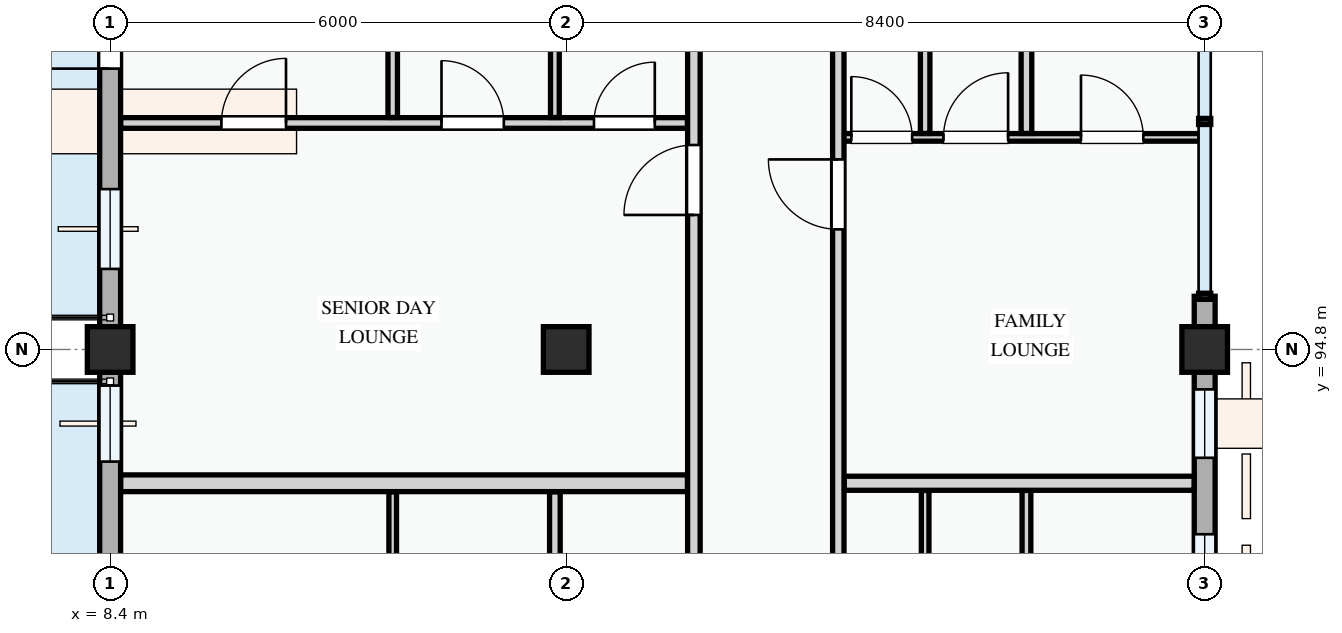
"""IFC4 building model, lengths in metres.
Left out: names, types, materials, properties, quantities, classifications, styles, units other than length and angle.
Written with IfcOpenShell. Run it as: python <this file> out.ifc"""

import sys

from ifc_helpers import new_model, si_unit, direction, frame, frame_2d, origin, origin_2d, place, context, subcontext, project, spatial, rectangle, extrude, element, fill, save


model = new_model("IFC4")
c1 = context("Model", 3, precision=1e-05, world=origin(), true_north=direction((0.0, 1.0)))
c2 = subcontext(c1, "Body", "Model", "MODEL_VIEW")
j1 = project(units=[si_unit("LENGTHUNIT", "METRE"), si_unit("PLANEANGLEUNIT", "RADIAN")], contexts=[c1])
p1 = place(None, origin())
s1 = spatial("IfcSite", under=j1, at=p1, CompositionType="ELEMENT")
p2 = place(p1, origin())
s2 = spatial("IfcBuilding", under=s1, at=p2, CompositionType="ELEMENT")
p3 = place(p2, frame((0.0, 0.0, 31.2)))
s3 = spatial("IfcBuildingStorey", under=s2, at=p3, CompositionType="ELEMENT", Elevation=31.2)
for number, where, z_axis, x_axis in (
    (1, (8.4, 94.8, 0.0), (0.0, 0.0, 1.0), (1.0, 0.0, 0.0)),
    (2, (14.4, 94.8, 0.0), (0.0, 0.0, 1.0), (1.0, 0.0, 0.0)),
    (3, (22.8, 94.8, 0.0), (0.0, 0.0, 1.0), (1.0, 0.0, 0.0)),
):
    element("IfcColumn", number, at=place(p3, frame(where, z_axis=z_axis, x_axis=x_axis)), inside=s3, PredefinedType="COLUMN", context=c2, shape_type="SweptSolid", body=[
        extrude(rectangle(XDim=0.6, YDim=0.6, at=origin_2d()), origin(), (0.0, 0.0, 1.0), 3.3),
    ])
p4 = place(p3, frame((8.4, 100.8, 0.0), z_axis=(0.0, 0.0, 1.0), x_axis=(0.0, -1.0, 0.0)))
e4 = element("IfcWall", 4, at=p4, inside=s3, PredefinedType="STANDARD", context=c2, shape_type="SweptSolid", body=[
    extrude(rectangle(XDim=6.0, YDim=0.275, at=frame_2d((3.0, 0.0))), origin(), (0.0, 0.0, 1.0), 2.575),
])
p5 = place(p4, frame((1.005, 0.0, 0.0)))
e5 = element("IfcOpeningElement", 5, at=p5, cuts=e4, PredefinedType="OPENING", context=c2, shape_type="SweptSolid", body=[
    extrude(rectangle(XDim=1.3, YDim=2.15, at=frame_2d((0.65, 1.075))), frame((0.0, 0.147, 0.0), z_axis=(0.0, -1.0, 0.0), x_axis=(1.0, 0.0, 0.0)), (0.0, 0.0, 1.0), 0.295),
])
p6 = place(p4, frame((3.89, 0.0, 0.78)))
e6 = element("IfcOpeningElement", 6, at=p6, cuts=e4, PredefinedType="OPENING", context=c2, shape_type="SweptSolid", body=[
    extrude(rectangle(XDim=1.05, YDim=1.2, at=frame_2d((0.525, 0.6))), frame((0.0, 0.147, 0.0), z_axis=(0.0, -1.0, 0.0), x_axis=(1.0, 0.0, 0.0)), (0.0, 0.0, 1.0), 0.295),
])
p7 = place(p3, frame((8.4, 94.8, 0.0), z_axis=(0.0, 0.0, 1.0), x_axis=(0.0, -1.0, 0.0)))
e7 = element("IfcWall", 7, at=p7, inside=s3, PredefinedType="STANDARD", context=c2, shape_type="SweptSolid", body=[
    extrude(rectangle(XDim=8.4, YDim=0.275, at=frame_2d((4.2, 0.0))), origin(), (0.0, 0.0, 1.0), 2.425),
])
p8 = place(p7, frame((2.705, 0.0, 0.0)))
e8 = element("IfcOpeningElement", 8, at=p8, cuts=e7, PredefinedType="OPENING", context=c2, shape_type="SweptSolid", body=[
    extrude(rectangle(XDim=1.4, YDim=2.2, at=frame_2d((0.7, 1.1))), frame((0.0, 0.147, 0.0), z_axis=(0.0, -1.0, 0.0), x_axis=(1.0, 0.0, 0.0)), (0.0, 0.0, 1.0), 0.295),
])
p9 = place(p7, frame((0.475, 0.0, 0.78)))
e9 = element("IfcOpeningElement", 9, at=p9, cuts=e7, PredefinedType="OPENING", context=c2, shape_type="SweptSolid", body=[
    extrude(rectangle(XDim=1.0, YDim=1.25, at=frame_2d((0.5, 0.625))), frame((0.0, 0.147, 0.0), z_axis=(0.0, -1.0, 0.0), x_axis=(1.0, 0.0, 0.0)), (0.0, 0.0, 1.0), 0.295),
])
p10 = place(p7, frame((6.08, 0.0, 0.78)))
e10 = element("IfcOpeningElement", 10, at=p10, cuts=e7, PredefinedType="OPENING", context=c2, shape_type="SweptSolid", body=[
    extrude(rectangle(XDim=1.1, YDim=1.3, at=frame_2d((0.55, 0.65))), frame((0.0, 0.147, 0.0), z_axis=(0.0, -1.0, 0.0), x_axis=(1.0, 0.0, 0.0)), (0.0, 0.0, 1.0), 0.295),
])
p11 = place(p3, frame((22.8, 86.4, 0.0), z_axis=(0.0, 0.0, 1.0), x_axis=(0.0, 1.0, 0.0)))
e11 = element("IfcWall", 11, at=p11, inside=s3, PredefinedType="STANDARD", context=c2, shape_type="SweptSolid", body=[
    extrude(rectangle(XDim=8.4, YDim=0.275, at=frame_2d((4.2, 0.0))), origin(), (0.0, 0.0, 1.0), 2.425),
])
p12 = place(p11, frame((1.154, 0.0, 0.78)))
e12 = element("IfcOpeningElement", 12, at=p12, cuts=e11, PredefinedType="OPENING", context=c2, shape_type="SweptSolid", body=[
    extrude(rectangle(XDim=1.1, YDim=1.3, at=frame_2d((0.55, 0.65))), frame((0.0, 0.147, 0.0), z_axis=(0.0, -1.0, 0.0), x_axis=(1.0, 0.0, 0.0)), (0.0, 0.0, 1.0), 0.295),
])
p13 = place(p11, frame((3.889, 0.0, 0.78)))
e13 = element("IfcOpeningElement", 13, at=p13, cuts=e11, PredefinedType="OPENING", context=c2, shape_type="SweptSolid", body=[
    extrude(rectangle(XDim=2.08, YDim=1.52, at=frame_2d((1.04, 0.76))), frame((0.0, 0.147, 0.0), z_axis=(0.0, -1.0, 0.0), x_axis=(1.0, 0.0, 0.0)), (0.0, 0.0, 1.0), 0.295),
])
p14 = place(p11, frame((6.975, 0.0, 0.78)))
e14 = element("IfcOpeningElement", 14, at=p14, cuts=e11, PredefinedType="OPENING", context=c2, shape_type="SweptSolid", body=[
    extrude(rectangle(XDim=0.9, YDim=1.2, at=frame_2d((0.45, 0.6))), frame((0.0, 0.147, 0.0), z_axis=(0.0, -1.0, 0.0), x_axis=(1.0, 0.0, 0.0)), (0.0, 0.0, 1.0), 0.295),
])
p15 = place(p3, frame((22.8, 94.8, 0.0), z_axis=(0.0, 0.0, 1.0), x_axis=(0.0, 1.0, 0.0)))
e15 = element("IfcWall", 15, at=p15, inside=s3, PredefinedType="STANDARD", context=c2, shape_type="SweptSolid", body=[
    extrude(rectangle(XDim=0.7, YDim=0.275, at=frame_2d((0.35, 0.0))), origin(), (0.0, 0.0, 1.0), 2.575),
])
p16 = place(p3, frame((12.118, 89.81, 0.0), z_axis=(0.0, 0.0, 1.0), x_axis=(0.0, 1.0, 0.0)))
e16 = element("IfcWall", 16, at=p16, inside=s3, PredefinedType="PARTITIONING", context=c2, shape_type="SweptSolid", body=[
    extrude(rectangle(XDim=3.118, YDim=0.1, at=frame_2d((1.559, 0.0))), origin(), (0.0, 0.0, 1.0), 3.0),
])
p17 = place(p3, frame((14.251, 89.81, 0.0), z_axis=(0.0, 0.0, 1.0), x_axis=(0.0, 1.0, 0.0)))
e17 = element("IfcWall", 17, at=p17, inside=s3, PredefinedType="PARTITIONING", context=c2, shape_type="SweptSolid", body=[
    extrude(rectangle(XDim=3.118, YDim=0.14, at=frame_2d((1.559, 0.0))), origin(), (0.0, 0.0, 1.0), 2.425),
])
p18 = place(p3, frame((20.455, 89.683, 0.0), z_axis=(0.0, 0.0, 1.0), x_axis=(0.0, 1.0, 0.0)))
e18 = element("IfcWall", 18, at=p18, inside=s3, PredefinedType="PARTITIONING", context=c2, shape_type="SweptSolid", body=[
    extrude(rectangle(XDim=3.263, YDim=0.115, at=frame_2d((1.631, 0.0))), origin(), (0.0, 0.0, 1.0), 3.0),
])
p19 = place(p3, frame((19.122, 89.683, 0.0), z_axis=(0.0, 0.0, 1.0), x_axis=(0.0, 1.0, 0.0)))
e19 = element("IfcWall", 19, at=p19, inside=s3, PredefinedType="PARTITIONING", context=c2, shape_type="SweptSolid", body=[
    extrude(rectangle(XDim=3.263, YDim=0.1, at=frame_2d((1.631, 0.0))), origin(), (0.0, 0.0, 1.0), 3.0),
])
p20 = place(p3, frame((8.54, 97.78, 0.0), z_axis=(0.0, 0.0, 1.0), x_axis=(1.0, 0.0, 0.0)))
e20 = element("IfcWall", 20, at=p20, inside=s3, PredefinedType="PARTITIONING", context=c2, shape_type="SweptSolid", body=[
    extrude(rectangle(XDim=7.456, YDim=0.14, at=frame_2d((3.728, 0.0))), origin(), (0.0, 0.0, 1.0), 3.0),
])
p21 = place(p20, frame((1.324, 0.0, 0.0)))
e21 = element("IfcOpeningElement", 21, at=p21, cuts=e20, PredefinedType="OPENING", context=c2, shape_type="SweptSolid", body=[
    extrude(rectangle(XDim=0.85, YDim=2.1, at=frame_2d((0.425, 1.05))), frame((0.0, 0.08, 0.0), z_axis=(0.0, -1.0, 0.0), x_axis=(1.0, 0.0, 0.0)), (0.0, 0.0, 1.0), 0.16),
])
p22 = place(p20, frame((4.22, 0.0, 0.0)))
e22 = element("IfcOpeningElement", 22, at=p22, cuts=e20, PredefinedType="OPENING", context=c2, shape_type="SweptSolid", body=[
    extrude(rectangle(XDim=0.82, YDim=2.08, at=frame_2d((0.41, 1.04))), frame((0.0, 0.08, 0.0), z_axis=(0.0, -1.0, 0.0), x_axis=(1.0, 0.0, 0.0)), (0.0, 0.0, 1.0), 0.16),
])
p23 = place(p20, frame((6.226, 0.0, 0.0)))
e23 = element("IfcOpeningElement", 23, at=p23, cuts=e20, PredefinedType="OPENING", context=c2, shape_type="SweptSolid", body=[
    extrude(rectangle(XDim=0.8, YDim=2.1, at=frame_2d((0.4, 1.05))), frame((0.0, 0.08, 0.0), z_axis=(0.0, -1.0, 0.0), x_axis=(1.0, 0.0, 0.0)), (0.0, 0.0, 1.0), 0.16),
])
p24 = place(p3, frame((12.118, 97.852, 0.0), z_axis=(0.0, 0.0, 1.0), x_axis=(0.0, 1.0, 0.0)))
e24 = element("IfcWall", 24, at=p24, inside=s3, PredefinedType="PARTITIONING", context=c2, shape_type="SweptSolid", body=[
    extrude(rectangle(XDim=4.566, YDim=0.125, at=frame_2d((2.283, 0.0))), origin(), (0.0, 0.0, 1.0), 3.0),
])
p25 = place(p3, frame((14.251, 97.852, 0.0), z_axis=(0.0, 0.0, 1.0), x_axis=(0.0, 1.0, 0.0)))
e25 = element("IfcWall", 25, at=p25, inside=s3, PredefinedType="PARTITIONING", context=c2, shape_type="SweptSolid", body=[
    extrude(rectangle(XDim=4.566, YDim=0.115, at=frame_2d((2.283, 0.0))), origin(), (0.0, 0.0, 1.0), 2.425),
])
p26 = place(p3, frame((17.98, 97.59, 0.0), z_axis=(0.0, 0.0, 1.0), x_axis=(1.0, 0.0, 0.0)))
e26 = element("IfcWall", 26, at=p26, inside=s3, PredefinedType="PARTITIONING", context=c2, shape_type="SweptSolid", body=[
    extrude(rectangle(XDim=4.76, YDim=0.1, at=frame_2d((2.38, 0.0))), origin(), (0.0, 0.0, 1.0), 3.0),
])
p27 = place(p26, frame((0.171, 0.0, 0.0)))
e27 = element("IfcOpeningElement", 27, at=p27, cuts=e26, PredefinedType="OPENING", context=c2, shape_type="SweptSolid", body=[
    extrude(rectangle(XDim=0.8, YDim=2.1, at=frame_2d((0.4, 1.05))), frame((0.0, 0.06, 0.0), z_axis=(0.0, -1.0, 0.0), x_axis=(1.0, 0.0, 0.0)), (0.0, 0.0, 1.0), 0.12),
])
p28 = place(p26, frame((1.384, 0.0, 0.0)))
e28 = element("IfcOpeningElement", 28, at=p28, cuts=e26, PredefinedType="OPENING", context=c2, shape_type="SweptSolid", body=[
    extrude(rectangle(XDim=0.85, YDim=2.1, at=frame_2d((0.425, 1.05))), frame((0.0, 0.06, 0.0), z_axis=(0.0, -1.0, 0.0), x_axis=(1.0, 0.0, 0.0)), (0.0, 0.0, 1.0), 0.12),
])
p29 = place(p26, frame((3.193, 0.0, 0.0)))
e29 = element("IfcOpeningElement", 29, at=p29, cuts=e26, PredefinedType="OPENING", context=c2, shape_type="SweptSolid", body=[
    extrude(rectangle(XDim=0.82, YDim=2.08, at=frame_2d((0.41, 1.04))), frame((0.0, 0.06, 0.0), z_axis=(0.0, -1.0, 0.0), x_axis=(1.0, 0.0, 0.0)), (0.0, 0.0, 1.0), 0.12),
])
p30 = place(p3, frame((20.455, 97.642, 0.0), z_axis=(0.0, 0.0, 1.0), x_axis=(0.0, 1.0, 0.0)))
e30 = element("IfcWall", 30, at=p30, inside=s3, PredefinedType="PARTITIONING", context=c2, shape_type="SweptSolid", body=[
    extrude(rectangle(XDim=4.766, YDim=0.14, at=frame_2d((2.383, 0.0))), origin(), (0.0, 0.0, 1.0), 3.0),
])
p31 = place(p3, frame((19.122, 97.642, 0.0), z_axis=(0.0, 0.0, 1.0), x_axis=(0.0, 1.0, 0.0)))
e31 = element("IfcWall", 31, at=p31, inside=s3, PredefinedType="PARTITIONING", context=c2, shape_type="SweptSolid", body=[
    extrude(rectangle(XDim=4.766, YDim=0.125, at=frame_2d((2.383, 0.0))), origin(), (0.0, 0.0, 1.0), 3.0),
])
p32 = place(p3, frame((8.54, 93.04, 0.0), z_axis=(0.0, 0.0, 1.0), x_axis=(1.0, 0.0, 0.0)))
e32 = element("IfcWall", 32, at=p32, inside=s3, PredefinedType="PARTITIONING", context=c2, shape_type="SweptSolid", body=[
    extrude(rectangle(XDim=7.456, YDim=0.22, at=frame_2d((3.728, 0.0))), origin(), (0.0, 0.0, 1.0), 3.0),
])
p33 = place(p3, frame((18.057, 93.04, 0.0), z_axis=(0.0, 0.0, 1.0), x_axis=(1.0, 0.0, 0.0)))
e33 = element("IfcWall", 33, at=p33, inside=s3, PredefinedType="PARTITIONING", context=c2, shape_type="SweptSolid", body=[
    extrude(rectangle(XDim=4.604, YDim=0.185, at=frame_2d((2.302, 0.0))), origin(), (0.0, 0.0, 1.0), 3.0),
])
p34 = place(p3, frame((16.08, 86.46, 0.0), z_axis=(0.0, 0.0, 1.0), x_axis=(0.0, 1.0, 0.0)))
e34 = element("IfcWall", 34, at=p34, inside=s3, PredefinedType="PARTITIONING", context=c2, shape_type="SweptSolid", body=[
    extrude(rectangle(XDim=22.88, YDim=0.165, at=frame_2d((11.44, 0.0))), origin(), (0.0, 0.0, 1.0), 3.0),
])
p35 = place(p34, frame((2.08, 0.0, 0.0)))
e35 = element("IfcOpeningElement", 35, at=p35, cuts=e34, PredefinedType="OPENING", context=c2, shape_type="SweptSolid", body=[
    extrude(rectangle(XDim=0.92, YDim=2.1, at=frame_2d((0.46, 1.05))), frame((0.0, 0.093, 0.0), z_axis=(0.0, -1.0, 0.0), x_axis=(1.0, 0.0, 0.0)), (0.0, 0.0, 1.0), 0.185),
])
p36 = place(p34, frame((10.11, 0.0, 0.0)))
e36 = element("IfcOpeningElement", 36, at=p36, cuts=e34, PredefinedType="OPENING", context=c2, shape_type="SweptSolid", body=[
    extrude(rectangle(XDim=0.92, YDim=2.1, at=frame_2d((0.46, 1.05))), frame((0.0, 0.093, 0.0), z_axis=(0.0, -1.0, 0.0), x_axis=(1.0, 0.0, 0.0)), (0.0, 0.0, 1.0), 0.185),
])
p37 = place(p34, frame((18.077, 0.0, 0.0)))
e37 = element("IfcOpeningElement", 37, at=p37, cuts=e34, PredefinedType="OPENING", context=c2, shape_type="SweptSolid", body=[
    extrude(rectangle(XDim=0.92, YDim=2.1, at=frame_2d((0.46, 1.05))), frame((0.0, 0.093, 0.0), z_axis=(0.0, -1.0, 0.0), x_axis=(1.0, 0.0, 0.0)), (0.0, 0.0, 1.0), 0.185),
])
p38 = place(p3, frame((17.98, 86.46, 0.0), z_axis=(0.0, 0.0, 1.0), x_axis=(0.0, 1.0, 0.0)))
e38 = element("IfcWall", 38, at=p38, inside=s3, PredefinedType="PARTITIONING", context=c2, shape_type="SweptSolid", body=[
    extrude(rectangle(XDim=22.88, YDim=0.15, at=frame_2d((11.44, 0.0))), origin(), (0.0, 0.0, 1.0), 3.0),
])
p39 = place(p38, frame((1.948, 0.0, 0.0)))
e39 = element("IfcOpeningElement", 39, at=p39, cuts=e38, PredefinedType="OPENING", context=c2, shape_type="SweptSolid", body=[
    extrude(rectangle(XDim=0.96, YDim=2.12, at=frame_2d((0.48, 1.06))), frame((0.0, 0.085, 0.0), z_axis=(0.0, -1.0, 0.0), x_axis=(1.0, 0.0, 0.0)), (0.0, 0.0, 1.0), 0.17),
])
p40 = place(p38, frame((9.92, 0.0, 0.0)))
e40 = element("IfcOpeningElement", 40, at=p40, cuts=e38, PredefinedType="OPENING", context=c2, shape_type="SweptSolid", body=[
    extrude(rectangle(XDim=0.92, YDim=2.1, at=frame_2d((0.46, 1.05))), frame((0.0, 0.085, 0.0), z_axis=(0.0, -1.0, 0.0), x_axis=(1.0, 0.0, 0.0)), (0.0, 0.0, 1.0), 0.17),
])
p41 = place(p38, frame((18.067, 0.0, 0.0)))
e41 = element("IfcOpeningElement", 41, at=p41, cuts=e38, PredefinedType="OPENING", context=c2, shape_type="SweptSolid", body=[
    extrude(rectangle(XDim=0.92, YDim=2.1, at=frame_2d((0.46, 1.05))), frame((0.0, 0.085, 0.0), z_axis=(0.0, -1.0, 0.0), x_axis=(1.0, 0.0, 0.0)), (0.0, 0.0, 1.0), 0.17),
])
p42 = place(p5, frame((1.3, 0.0, 0.0), z_axis=(0.0, 0.0, 1.0), x_axis=(-1.0, 0.0, 0.0)))
e42 = element("IfcDoor", 42, at=p42, inside=s3, OperationType="SINGLE_SWING_LEFT", PredefinedType="DOOR", context=c2, shape_type="SweptSolid", body=[
    extrude(rectangle(XDim=1.3, YDim=2.15, at=frame_2d((0.65, 1.075))), frame((0.0, 0.025, 0.0), z_axis=(0.0, -1.0, 0.0), x_axis=(1.0, 0.0, 0.0)), (0.0, 0.0, 1.0), 0.05),
])
fill(e5, e42)
p43 = place(p6, origin())
e43 = element("IfcWindow", 43, at=p43, inside=s3, PartitioningType="SINGLE_PANEL", PredefinedType="WINDOW", context=c2, shape_type="SweptSolid", body=[
    extrude(rectangle(XDim=1.05, YDim=1.2, at=frame_2d((0.525, 0.6))), frame((0.0, 0.03, 0.0), z_axis=(0.0, -1.0, 0.0), x_axis=(1.0, 0.0, 0.0)), (0.0, 0.0, 1.0), 0.06),
])
fill(e6, e43)
p44 = place(p9, origin())
e44 = element("IfcWindow", 44, at=p44, inside=s3, PartitioningType="SINGLE_PANEL", PredefinedType="WINDOW", context=c2, shape_type="SweptSolid", body=[
    extrude(rectangle(XDim=1.0, YDim=1.25, at=frame_2d((0.5, 0.625))), frame((0.0, 0.03, 0.0), z_axis=(0.0, -1.0, 0.0), x_axis=(1.0, 0.0, 0.0)), (0.0, 0.0, 1.0), 0.06),
])
fill(e9, e44)
p45 = place(p13, origin())
e45 = element("IfcWindow", 45, at=p45, inside=s3, PartitioningType="DOUBLE_PANEL_VERTICAL", PredefinedType="WINDOW", context=c2, shape_type="SweptSolid", body=[
    extrude(rectangle(XDim=2.08, YDim=1.52, at=frame_2d((1.04, 0.76))), frame((0.0, 0.03, 0.0), z_axis=(0.0, -1.0, 0.0), x_axis=(1.0, 0.0, 0.0)), (0.0, 0.0, 1.0), 0.06),
])
fill(e13, e45)
p46 = place(p14, origin())
e46 = element("IfcWindow", 46, at=p46, inside=s3, PartitioningType="SINGLE_PANEL", PredefinedType="WINDOW", context=c2, shape_type="SweptSolid", body=[
    extrude(rectangle(XDim=0.9, YDim=1.2, at=frame_2d((0.45, 0.6))), frame((0.0, 0.03, 0.0), z_axis=(0.0, -1.0, 0.0), x_axis=(1.0, 0.0, 0.0)), (0.0, 0.0, 1.0), 0.06),
])
fill(e14, e46)
p47 = place(p21, origin())
e47 = element("IfcDoor", 47, at=p47, inside=s3, OperationType="SINGLE_SWING_RIGHT", PredefinedType="DOOR", context=c2, shape_type="SweptSolid", body=[
    extrude(rectangle(XDim=0.85, YDim=2.1, at=frame_2d((0.425, 1.05))), frame((0.0, 0.025, 0.0), z_axis=(0.0, -1.0, 0.0), x_axis=(1.0, 0.0, 0.0)), (0.0, 0.0, 1.0), 0.05),
])
fill(e21, e47)
p48 = place(p22, origin())
e48 = element("IfcDoor", 48, at=p48, inside=s3, OperationType="SINGLE_SWING_LEFT", PredefinedType="DOOR", context=c2, shape_type="SweptSolid", body=[
    extrude(rectangle(XDim=0.82, YDim=2.08, at=frame_2d((0.41, 1.04))), frame((0.0, 0.025, 0.0), z_axis=(0.0, -1.0, 0.0), x_axis=(1.0, 0.0, 0.0)), (0.0, 0.0, 1.0), 0.05),
])
fill(e22, e48)
p49 = place(p23, origin())
e49 = element("IfcDoor", 49, at=p49, inside=s3, OperationType="SINGLE_SWING_RIGHT", PredefinedType="DOOR", context=c2, shape_type="SweptSolid", body=[
    extrude(rectangle(XDim=0.8, YDim=2.1, at=frame_2d((0.4, 1.05))), frame((0.0, 0.025, 0.0), z_axis=(0.0, -1.0, 0.0), x_axis=(1.0, 0.0, 0.0)), (0.0, 0.0, 1.0), 0.05),
])
fill(e23, e49)
p50 = place(p27, origin())
e50 = element("IfcDoor", 50, at=p50, inside=s3, OperationType="SINGLE_SWING_LEFT", PredefinedType="DOOR", context=c2, shape_type="SweptSolid", body=[
    extrude(rectangle(XDim=0.8, YDim=2.1, at=frame_2d((0.4, 1.05))), frame((0.0, 0.025, 0.0), z_axis=(0.0, -1.0, 0.0), x_axis=(1.0, 0.0, 0.0)), (0.0, 0.0, 1.0), 0.05),
])
fill(e27, e50)
p51 = place(p28, origin())
e51 = element("IfcDoor", 51, at=p51, inside=s3, OperationType="SINGLE_SWING_RIGHT", PredefinedType="DOOR", context=c2, shape_type="SweptSolid", body=[
    extrude(rectangle(XDim=0.85, YDim=2.1, at=frame_2d((0.425, 1.05))), frame((0.0, 0.025, 0.0), z_axis=(0.0, -1.0, 0.0), x_axis=(1.0, 0.0, 0.0)), (0.0, 0.0, 1.0), 0.05),
])
fill(e28, e51)
p52 = place(p29, origin())
e52 = element("IfcDoor", 52, at=p52, inside=s3, OperationType="SINGLE_SWING_LEFT", PredefinedType="DOOR", context=c2, shape_type="SweptSolid", body=[
    extrude(rectangle(XDim=0.82, YDim=2.08, at=frame_2d((0.41, 1.04))), frame((0.0, 0.025, 0.0), z_axis=(0.0, -1.0, 0.0), x_axis=(1.0, 0.0, 0.0)), (0.0, 0.0, 1.0), 0.05),
])
fill(e29, e52)
p53 = place(p36, origin())
e53 = element("IfcDoor", 53, at=p53, inside=s3, OperationType="SINGLE_SWING_LEFT", PredefinedType="DOOR", context=c2, shape_type="SweptSolid", body=[
    extrude(rectangle(XDim=0.92, YDim=2.1, at=frame_2d((0.46, 1.05))), frame((0.0, 0.025, 0.0), z_axis=(0.0, -1.0, 0.0), x_axis=(1.0, 0.0, 0.0)), (0.0, 0.0, 1.0), 0.05),
])
fill(e36, e53)
p54 = place(p40, origin())
e54 = element("IfcDoor", 54, at=p54, inside=s3, OperationType="SINGLE_SWING_RIGHT", PredefinedType="DOOR", context=c2, shape_type="SweptSolid", body=[
    extrude(rectangle(XDim=0.92, YDim=2.1, at=frame_2d((0.46, 1.05))), frame((0.0, 0.025, 0.0), z_axis=(0.0, -1.0, 0.0), x_axis=(1.0, 0.0, 0.0)), (0.0, 0.0, 1.0), 0.05),
])
fill(e40, e54)
save(model, sys.argv[1])
